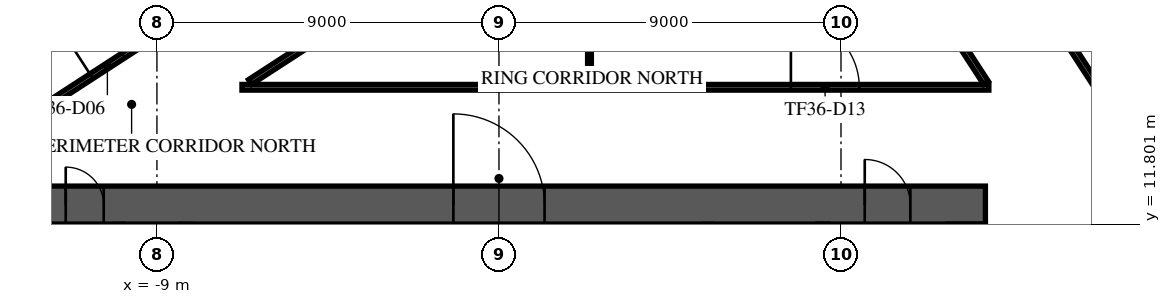
"""IFC4 building model, lengths in metres.
Left out: names, types, materials, properties, quantities, classifications, styles, units other than length and angle.
Written with IfcOpenShell. Run it as: python <this file> out.ifc"""

import sys

from ifc_helpers import new_model, si_unit, direction, frame, frame_2d, origin, place, context, subcontext, project, spatial, rectangle, extrude, element, fill, save


model = new_model("IFC4")
c1 = context("Model", 3, precision=1e-05, world=origin(), true_north=direction((0.0, 1.0)))
c2 = subcontext(c1, "Body", "Model", "MODEL_VIEW")
j1 = project(units=[si_unit("LENGTHUNIT", "METRE"), si_unit("PLANEANGLEUNIT", "RADIAN")], contexts=[c1])
p1 = place(None, origin())
s1 = spatial("IfcSite", under=j1, at=p1, CompositionType="ELEMENT")
p2 = place(p1, origin())
s2 = spatial("IfcBuilding", under=s1, at=p2, CompositionType="ELEMENT")
p3 = place(p2, frame((0.0, 0.0, 155.7)))
s3 = spatial("IfcBuildingStorey", under=s2, at=p3, CompositionType="ELEMENT", Elevation=155.7)
p4 = place(p3, frame((-12.8, 12.3, 0.0), z_axis=(0.0, 0.0, 1.0), x_axis=(1.0, 0.0, 0.0)))
e1 = element("IfcWall", 1, at=p4, inside=s3, PredefinedType="SHEAR", context=c2, shape_type="SweptSolid", body=[
    extrude(rectangle(XDim=25.6, YDim=1.0, at=frame_2d((12.8, 0.0))), origin(), (0.0, 0.0, 1.0), 3.6),
])
p5 = place(p4, frame((11.6, 0.0, 0.0)))
e2 = element("IfcOpeningElement", 2, at=p5, cuts=e1, PredefinedType="OPENING", context=c2, shape_type="SweptSolid", body=[
    extrude(rectangle(XDim=2.4, YDim=2.4, at=frame_2d((1.2, 1.2))), frame((0.0, 0.51, 0.0), z_axis=(0.0, -1.0, 0.0), x_axis=(1.0, 0.0, 0.0)), (0.0, 0.0, 1.0), 1.02),
])
p6 = place(p4, frame((22.425, 0.0, 0.0)))
e3 = element("IfcOpeningElement", 3, at=p6, cuts=e1, PredefinedType="OPENING", context=c2, shape_type="SweptSolid", body=[
    extrude(rectangle(XDim=1.2, YDim=2.1, at=frame_2d((0.6, 1.05))), frame((0.0, 0.51, 0.0), z_axis=(0.0, -1.0, 0.0), x_axis=(1.0, 0.0, 0.0)), (0.0, 0.0, 1.0), 1.02),
])
p7 = place(p4, frame((1.4, 0.0, 0.0)))
e4 = element("IfcOpeningElement", 4, at=p7, cuts=e1, PredefinedType="OPENING", context=c2, shape_type="SweptSolid", body=[
    extrude(rectangle(XDim=1.0, YDim=2.1, at=frame_2d((0.5, 1.05))), frame((0.0, 0.51, 0.0), z_axis=(0.0, -1.0, 0.0), x_axis=(1.0, 0.0, 0.0)), (0.0, 0.0, 1.0), 1.02),
])
p8 = place(p3, frame((6.333, 35.233, 0.0), z_axis=(0.0, 0.0, 1.0), x_axis=(-0.83867264201, -0.544635841222, 0.0)))
e5 = element("IfcWall", 5, at=p8, inside=s3, PredefinedType="STANDARD", context=c2, shape_type="SweptSolid", body=[
    extrude(rectangle(XDim=49.376, YDim=0.6, at=frame_2d((24.688, 0.0))), origin(), (0.0, 0.0, 1.0), 3.6),
])
p9 = place(p8, frame((1.2, 0.0, 0.9)))
e6 = element("IfcOpeningElement", 6, at=p9, cuts=e5, PredefinedType="OPENING", context=c2, shape_type="SweptSolid", body=[
    extrude(rectangle(XDim=2.1, YDim=2.1, at=frame_2d((1.05, 1.05))), frame((0.0, 0.31, 0.0), z_axis=(0.0, -1.0, 0.0), x_axis=(1.0, 0.0, 0.0)), (0.0, 0.0, 1.0), 0.62),
])
p10 = place(p8, frame((5.7, 0.0, 0.9)))
e7 = element("IfcOpeningElement", 7, at=p10, cuts=e5, PredefinedType="OPENING", context=c2, shape_type="SweptSolid", body=[
    extrude(rectangle(XDim=2.1, YDim=2.1, at=frame_2d((1.05, 1.05))), frame((0.0, 0.31, 0.0), z_axis=(0.0, -1.0, 0.0), x_axis=(1.0, 0.0, 0.0)), (0.0, 0.0, 1.0), 0.62),
])
p11 = place(p8, frame((10.2, 0.0, 0.9)))
e8 = element("IfcOpeningElement", 8, at=p11, cuts=e5, PredefinedType="OPENING", context=c2, shape_type="SweptSolid", body=[
    extrude(rectangle(XDim=2.1, YDim=2.1, at=frame_2d((1.05, 1.05))), frame((0.0, 0.31, 0.0), z_axis=(0.0, -1.0, 0.0), x_axis=(1.0, 0.0, 0.0)), (0.0, 0.0, 1.0), 0.62),
])
p12 = place(p8, frame((14.7, 0.0, 0.9)))
e9 = element("IfcOpeningElement", 9, at=p12, cuts=e5, PredefinedType="OPENING", context=c2, shape_type="SweptSolid", body=[
    extrude(rectangle(XDim=2.1, YDim=2.1, at=frame_2d((1.05, 1.05))), frame((0.0, 0.31, 0.0), z_axis=(0.0, -1.0, 0.0), x_axis=(1.0, 0.0, 0.0)), (0.0, 0.0, 1.0), 0.62),
])
p13 = place(p8, frame((19.2, 0.0, 0.9)))
e10 = element("IfcOpeningElement", 10, at=p13, cuts=e5, PredefinedType="OPENING", context=c2, shape_type="SweptSolid", body=[
    extrude(rectangle(XDim=2.1, YDim=2.1, at=frame_2d((1.05, 1.05))), frame((0.0, 0.31, 0.0), z_axis=(0.0, -1.0, 0.0), x_axis=(1.0, 0.0, 0.0)), (0.0, 0.0, 1.0), 0.62),
])
p14 = place(p8, frame((23.7, 0.0, 0.9)))
e11 = element("IfcOpeningElement", 11, at=p14, cuts=e5, PredefinedType="OPENING", context=c2, shape_type="SweptSolid", body=[
    extrude(rectangle(XDim=2.1, YDim=2.1, at=frame_2d((1.05, 1.05))), frame((0.0, 0.31, 0.0), z_axis=(0.0, -1.0, 0.0), x_axis=(1.0, 0.0, 0.0)), (0.0, 0.0, 1.0), 0.62),
])
p15 = place(p8, frame((28.2, 0.0, 0.9)))
e12 = element("IfcOpeningElement", 12, at=p15, cuts=e5, PredefinedType="OPENING", context=c2, shape_type="SweptSolid", body=[
    extrude(rectangle(XDim=2.1, YDim=2.1, at=frame_2d((1.05, 1.05))), frame((0.0, 0.31, 0.0), z_axis=(0.0, -1.0, 0.0), x_axis=(1.0, 0.0, 0.0)), (0.0, 0.0, 1.0), 0.62),
])
p16 = place(p8, frame((32.7, 0.0, 0.9)))
e13 = element("IfcOpeningElement", 13, at=p16, cuts=e5, PredefinedType="OPENING", context=c2, shape_type="SweptSolid", body=[
    extrude(rectangle(XDim=2.1, YDim=2.1, at=frame_2d((1.05, 1.05))), frame((0.0, 0.31, 0.0), z_axis=(0.0, -1.0, 0.0), x_axis=(1.0, 0.0, 0.0)), (0.0, 0.0, 1.0), 0.62),
])
p17 = place(p8, frame((37.2, 0.0, 0.9)))
e14 = element("IfcOpeningElement", 14, at=p17, cuts=e5, PredefinedType="OPENING", context=c2, shape_type="SweptSolid", body=[
    extrude(rectangle(XDim=2.1, YDim=2.1, at=frame_2d((1.05, 1.05))), frame((0.0, 0.31, 0.0), z_axis=(0.0, -1.0, 0.0), x_axis=(1.0, 0.0, 0.0)), (0.0, 0.0, 1.0), 0.62),
])
p18 = place(p8, frame((41.7, 0.0, 0.9)))
e15 = element("IfcOpeningElement", 15, at=p18, cuts=e5, PredefinedType="OPENING", context=c2, shape_type="SweptSolid", body=[
    extrude(rectangle(XDim=2.1, YDim=2.1, at=frame_2d((1.05, 1.05))), frame((0.0, 0.31, 0.0), z_axis=(0.0, -1.0, 0.0), x_axis=(1.0, 0.0, 0.0)), (0.0, 0.0, 1.0), 0.62),
])
p19 = place(p8, frame((46.138, 0.0, 0.9)))
e16 = element("IfcOpeningElement", 16, at=p19, cuts=e5, PredefinedType="OPENING", context=c2, shape_type="SweptSolid", body=[
    extrude(rectangle(XDim=2.1, YDim=2.1, at=frame_2d((1.05, 1.05))), frame((0.0, 0.31, 0.0), z_axis=(0.0, -1.0, 0.0), x_axis=(1.0, 0.0, 0.0)), (0.0, 0.0, 1.0), 0.62),
])
p20 = place(p3, frame((36.496, -1.667, 0.0), z_axis=(0.0, 0.0, 1.0), x_axis=(-0.544637117646, 0.838671813096, 0.0)))
e17 = element("IfcWall", 17, at=p20, inside=s3, PredefinedType="STANDARD", context=c2, shape_type="SweptSolid", body=[
    extrude(rectangle(XDim=42.176, YDim=0.6, at=frame_2d((21.088, 0.0))), origin(), (0.0, 0.0, 1.0), 3.6),
])
p21 = place(p20, frame((1.138, 0.0, 0.9)))
e18 = element("IfcOpeningElement", 18, at=p21, cuts=e17, PredefinedType="OPENING", context=c2, shape_type="SweptSolid", body=[
    extrude(rectangle(XDim=2.3, YDim=2.1, at=frame_2d((1.15, 1.05))), frame((0.0, 0.31, 0.0), z_axis=(0.0, -1.0, 0.0), x_axis=(1.0, 0.0, 0.0)), (0.0, 0.0, 1.0), 0.62),
])
p22 = place(p20, frame((5.776, 0.0, 0.9)))
e19 = element("IfcOpeningElement", 19, at=p22, cuts=e17, PredefinedType="OPENING", context=c2, shape_type="SweptSolid", body=[
    extrude(rectangle(XDim=2.3, YDim=2.1, at=frame_2d((1.15, 1.05))), frame((0.0, 0.31, 0.0), z_axis=(0.0, -1.0, 0.0), x_axis=(1.0, 0.0, 0.0)), (0.0, 0.0, 1.0), 0.62),
])
p23 = place(p20, frame((10.476, 0.0, 0.9)))
e20 = element("IfcOpeningElement", 20, at=p23, cuts=e17, PredefinedType="OPENING", context=c2, shape_type="SweptSolid", body=[
    extrude(rectangle(XDim=2.3, YDim=2.1, at=frame_2d((1.15, 1.05))), frame((0.0, 0.31, 0.0), z_axis=(0.0, -1.0, 0.0), x_axis=(1.0, 0.0, 0.0)), (0.0, 0.0, 1.0), 0.62),
])
p24 = place(p20, frame((15.176, 0.0, 0.9)))
e21 = element("IfcOpeningElement", 21, at=p24, cuts=e17, PredefinedType="OPENING", context=c2, shape_type="SweptSolid", body=[
    extrude(rectangle(XDim=2.3, YDim=2.1, at=frame_2d((1.15, 1.05))), frame((0.0, 0.31, 0.0), z_axis=(0.0, -1.0, 0.0), x_axis=(1.0, 0.0, 0.0)), (0.0, 0.0, 1.0), 0.62),
])
p25 = place(p20, frame((19.876, 0.0, 0.9)))
e22 = element("IfcOpeningElement", 22, at=p25, cuts=e17, PredefinedType="OPENING", context=c2, shape_type="SweptSolid", body=[
    extrude(rectangle(XDim=2.3, YDim=2.1, at=frame_2d((1.15, 1.05))), frame((0.0, 0.31, 0.0), z_axis=(0.0, -1.0, 0.0), x_axis=(1.0, 0.0, 0.0)), (0.0, 0.0, 1.0), 0.62),
])
p26 = place(p20, frame((24.576, 0.0, 0.9)))
e23 = element("IfcOpeningElement", 23, at=p26, cuts=e17, PredefinedType="OPENING", context=c2, shape_type="SweptSolid", body=[
    extrude(rectangle(XDim=2.3, YDim=2.1, at=frame_2d((1.15, 1.05))), frame((0.0, 0.31, 0.0), z_axis=(0.0, -1.0, 0.0), x_axis=(1.0, 0.0, 0.0)), (0.0, 0.0, 1.0), 0.62),
])
p27 = place(p20, frame((29.276, 0.0, 0.9)))
e24 = element("IfcOpeningElement", 24, at=p27, cuts=e17, PredefinedType="OPENING", context=c2, shape_type="SweptSolid", body=[
    extrude(rectangle(XDim=2.3, YDim=2.1, at=frame_2d((1.15, 1.05))), frame((0.0, 0.31, 0.0), z_axis=(0.0, -1.0, 0.0), x_axis=(1.0, 0.0, 0.0)), (0.0, 0.0, 1.0), 0.62),
])
p28 = place(p20, frame((33.976, 0.0, 0.9)))
e25 = element("IfcOpeningElement", 25, at=p28, cuts=e17, PredefinedType="OPENING", context=c2, shape_type="SweptSolid", body=[
    extrude(rectangle(XDim=2.3, YDim=2.1, at=frame_2d((1.15, 1.05))), frame((0.0, 0.31, 0.0), z_axis=(0.0, -1.0, 0.0), x_axis=(1.0, 0.0, 0.0)), (0.0, 0.0, 1.0), 0.62),
])
p29 = place(p20, frame((38.676, 0.0, 0.9)))
e26 = element("IfcOpeningElement", 26, at=p29, cuts=e17, PredefinedType="OPENING", context=c2, shape_type="SweptSolid", body=[
    extrude(rectangle(XDim=2.3, YDim=2.1, at=frame_2d((1.15, 1.05))), frame((0.0, 0.31, 0.0), z_axis=(0.0, -1.0, 0.0), x_axis=(1.0, 0.0, 0.0)), (0.0, 0.0, 1.0), 0.62),
])
p30 = place(p3, frame((-25.134, 6.331, 0.0), z_axis=(0.0, 0.0, 1.0), x_axis=(0.838655992286, 0.544661478904, 0.0)))
e27 = element("IfcWall", 27, at=p30, inside=s3, PredefinedType="PARTITIONING", context=c2, shape_type="SweptSolid", body=[
    extrude(rectangle(XDim=35.262, YDim=0.15, at=frame_2d((17.631, 0.0))), origin(), (0.0, 0.0, 1.0), 3.15),
])
p31 = place(p30, frame((0.55, 0.0, 0.0)))
e28 = element("IfcOpeningElement", 28, at=p31, cuts=e27, PredefinedType="OPENING", context=c2, shape_type="SweptSolid", body=[
    extrude(rectangle(XDim=1.0, YDim=2.1, at=frame_2d((0.5, 1.05))), frame((0.0, 0.085, 0.0), z_axis=(0.0, -1.0, 0.0), x_axis=(1.0, 0.0, 0.0)), (0.0, 0.0, 1.0), 0.17),
])
p32 = place(p30, frame((5.989, 0.0, 0.0)))
e29 = element("IfcOpeningElement", 29, at=p32, cuts=e27, PredefinedType="OPENING", context=c2, shape_type="SweptSolid", body=[
    extrude(rectangle(XDim=1.0, YDim=2.1, at=frame_2d((0.5, 1.05))), frame((0.0, 0.085, 0.0), z_axis=(0.0, -1.0, 0.0), x_axis=(1.0, 0.0, 0.0)), (0.0, 0.0, 1.0), 0.17),
])
p33 = place(p30, frame((17.183, 0.0, 0.0)))
e30 = element("IfcOpeningElement", 30, at=p33, cuts=e27, PredefinedType="OPENING", context=c2, shape_type="SweptSolid", body=[
    extrude(rectangle(XDim=1.0, YDim=2.1, at=frame_2d((0.5, 1.05))), frame((0.0, 0.085, 0.0), z_axis=(0.0, -1.0, 0.0), x_axis=(1.0, 0.0, 0.0)), (0.0, 0.0, 1.0), 0.17),
])
p34 = place(p30, frame((25.102, 0.0, 0.0)))
e31 = element("IfcOpeningElement", 31, at=p34, cuts=e27, PredefinedType="OPENING", context=c2, shape_type="SweptSolid", body=[
    extrude(rectangle(XDim=1.0, YDim=2.1, at=frame_2d((0.5, 1.05))), frame((0.0, 0.085, 0.0), z_axis=(0.0, -1.0, 0.0), x_axis=(1.0, 0.0, 0.0)), (0.0, 0.0, 1.0), 0.17),
])
p35 = place(p3, frame((-6.763, 15.4, 0.0), z_axis=(0.0, 0.0, 1.0), x_axis=(1.0, 0.0, 0.0)))
e32 = element("IfcWall", 32, at=p35, inside=s3, PredefinedType="PARTITIONING", context=c2, shape_type="SweptSolid", body=[
    extrude(rectangle(XDim=19.654, YDim=0.15, at=frame_2d((9.827, 0.0))), origin(), (0.0, 0.0, 1.0), 3.15),
])
p36 = place(p35, frame((14.445, 0.0, 0.0)))
e33 = element("IfcOpeningElement", 33, at=p36, cuts=e32, PredefinedType="OPENING", context=c2, shape_type="SweptSolid", body=[
    extrude(rectangle(XDim=1.8, YDim=2.1, at=frame_2d((0.9, 1.05))), frame((0.0, 0.085, 0.0), z_axis=(0.0, -1.0, 0.0), x_axis=(1.0, 0.0, 0.0)), (0.0, 0.0, 1.0), 0.17),
])
p37 = place(p3, frame((-6.551, 15.538, 0.0), z_axis=(0.0, 0.0, 1.0), x_axis=(0.838658107211, 0.544658222383, 0.0)))
e34 = element("IfcWall", 34, at=p37, inside=s3, PredefinedType="PARTITIONING", context=c2, shape_type="SweptSolid", body=[
    extrude(rectangle(XDim=14.663, YDim=0.15, at=frame_2d((7.331, 0.0))), origin(), (0.0, 0.0, 1.0), 3.15),
])
p38 = place(p37, frame((8.05, 0.0, 0.0)))
e35 = element("IfcOpeningElement", 35, at=p38, cuts=e34, PredefinedType="OPENING", context=c2, shape_type="SweptSolid", body=[
    extrude(rectangle(XDim=1.0, YDim=2.1, at=frame_2d((0.5, 1.05))), frame((0.0, 0.085, 0.0), z_axis=(0.0, -1.0, 0.0), x_axis=(1.0, 0.0, 0.0)), (0.0, 0.0, 1.0), 0.17),
])
p39 = place(p3, frame((8.946, 21.476, 0.0), z_axis=(0.0, 0.0, 1.0), x_axis=(0.544591006373, -0.838701756155, 0.0)))
e36 = element("IfcWall", 36, at=p39, inside=s3, PredefinedType="PARTITIONING", context=c2, shape_type="SweptSolid", body=[
    extrude(rectangle(XDim=7.106, YDim=0.15, at=frame_2d((3.553, 0.0))), origin(), (0.0, 0.0, 1.0), 3.15),
])
p40 = place(p39, frame((0.55, 0.0, 0.0)))
e37 = element("IfcOpeningElement", 37, at=p40, cuts=e36, PredefinedType="OPENING", context=c2, shape_type="SweptSolid", body=[
    extrude(rectangle(XDim=1.0, YDim=2.1, at=frame_2d((0.5, 1.05))), frame((0.0, 0.085, 0.0), z_axis=(0.0, -1.0, 0.0), x_axis=(1.0, 0.0, 0.0)), (0.0, 0.0, 1.0), 0.17),
])
p41 = place(p3, frame((10.958, 22.783, 0.0), z_axis=(0.0, 0.0, 1.0), x_axis=(0.544655201926, -0.838660068809, 0.0)))
e38 = element("IfcWall", 38, at=p41, inside=s3, PredefinedType="PARTITIONING", context=c2, shape_type="SweptSolid", body=[
    extrude(rectangle(XDim=26.354, YDim=0.15, at=frame_2d((13.177, 0.0))), origin(), (0.0, 0.0, 1.0), 3.15),
])
p42 = place(p41, frame((13.46, 0.0, 0.0)))
e39 = element("IfcOpeningElement", 39, at=p42, cuts=e38, PredefinedType="OPENING", context=c2, shape_type="SweptSolid", body=[
    extrude(rectangle(XDim=1.0, YDim=2.1, at=frame_2d((0.5, 1.05))), frame((0.0, 0.085, 0.0), z_axis=(0.0, -1.0, 0.0), x_axis=(1.0, 0.0, 0.0)), (0.0, 0.0, 1.0), 0.17),
])
p43 = place(p3, frame((2.382, 15.475, 0.0), z_axis=(0.0, 0.0, 1.0), x_axis=(0.0, 1.0, 0.0)))
e40 = element("IfcWall", 40, at=p43, inside=s3, PredefinedType="PARTITIONING", context=c2, shape_type="SweptSolid", body=[
    extrude(rectangle(XDim=5.742, YDim=0.1, at=frame_2d((2.871, 0.0))), origin(), (0.0, 0.0, 1.0), 3.15),
])
p44 = place(p5, origin())
e41 = element("IfcDoor", 41, at=p44, inside=s3, OperationType="SINGLE_SWING_LEFT", PredefinedType="DOOR", context=c2, shape_type="SweptSolid", body=[
    extrude(rectangle(XDim=2.4, YDim=2.4, at=frame_2d((1.2, 1.2))), frame((0.0, 0.025, 0.0), z_axis=(0.0, -1.0, 0.0), x_axis=(1.0, 0.0, 0.0)), (0.0, 0.0, 1.0), 0.05),
])
fill(e2, e41)
p45 = place(p6, origin())
e42 = element("IfcDoor", 42, at=p45, inside=s3, OperationType="SINGLE_SWING_LEFT", PredefinedType="DOOR", context=c2, shape_type="SweptSolid", body=[
    extrude(rectangle(XDim=1.2, YDim=2.1, at=frame_2d((0.6, 1.05))), frame((0.0, 0.025, 0.0), z_axis=(0.0, -1.0, 0.0), x_axis=(1.0, 0.0, 0.0)), (0.0, 0.0, 1.0), 0.05),
])
fill(e3, e42)
p46 = place(p7, origin())
e43 = element("IfcDoor", 43, at=p46, inside=s3, OperationType="SINGLE_SWING_LEFT", PredefinedType="DOOR", context=c2, shape_type="SweptSolid", body=[
    extrude(rectangle(XDim=1.0, YDim=2.1, at=frame_2d((0.5, 1.05))), frame((0.0, 0.025, 0.0), z_axis=(0.0, -1.0, 0.0), x_axis=(1.0, 0.0, 0.0)), (0.0, 0.0, 1.0), 0.05),
])
fill(e4, e43)
p47 = place(p33, origin())
e44 = element("IfcDoor", 44, at=p47, inside=s3, OperationType="SINGLE_SWING_RIGHT", PredefinedType="DOOR", context=c2, shape_type="SweptSolid", body=[
    extrude(rectangle(XDim=1.0, YDim=2.1, at=frame_2d((0.5, 1.05))), frame((0.0, 0.025, 0.0), z_axis=(0.0, -1.0, 0.0), x_axis=(1.0, 0.0, 0.0)), (0.0, 0.0, 1.0), 0.05),
])
fill(e30, e44)
p48 = place(p36, origin())
e45 = element("IfcDoor", 45, at=p48, inside=s3, OperationType="DOUBLE_DOOR_SINGLE_SWING", PredefinedType="DOOR", context=c2, shape_type="SweptSolid", body=[
    extrude(rectangle(XDim=1.8, YDim=2.1, at=frame_2d((0.9, 1.05))), frame((0.0, 0.025, 0.0), z_axis=(0.0, -1.0, 0.0), x_axis=(1.0, 0.0, 0.0)), (0.0, 0.0, 1.0), 0.05),
])
fill(e33, e45)
save(model, sys.argv[1])
